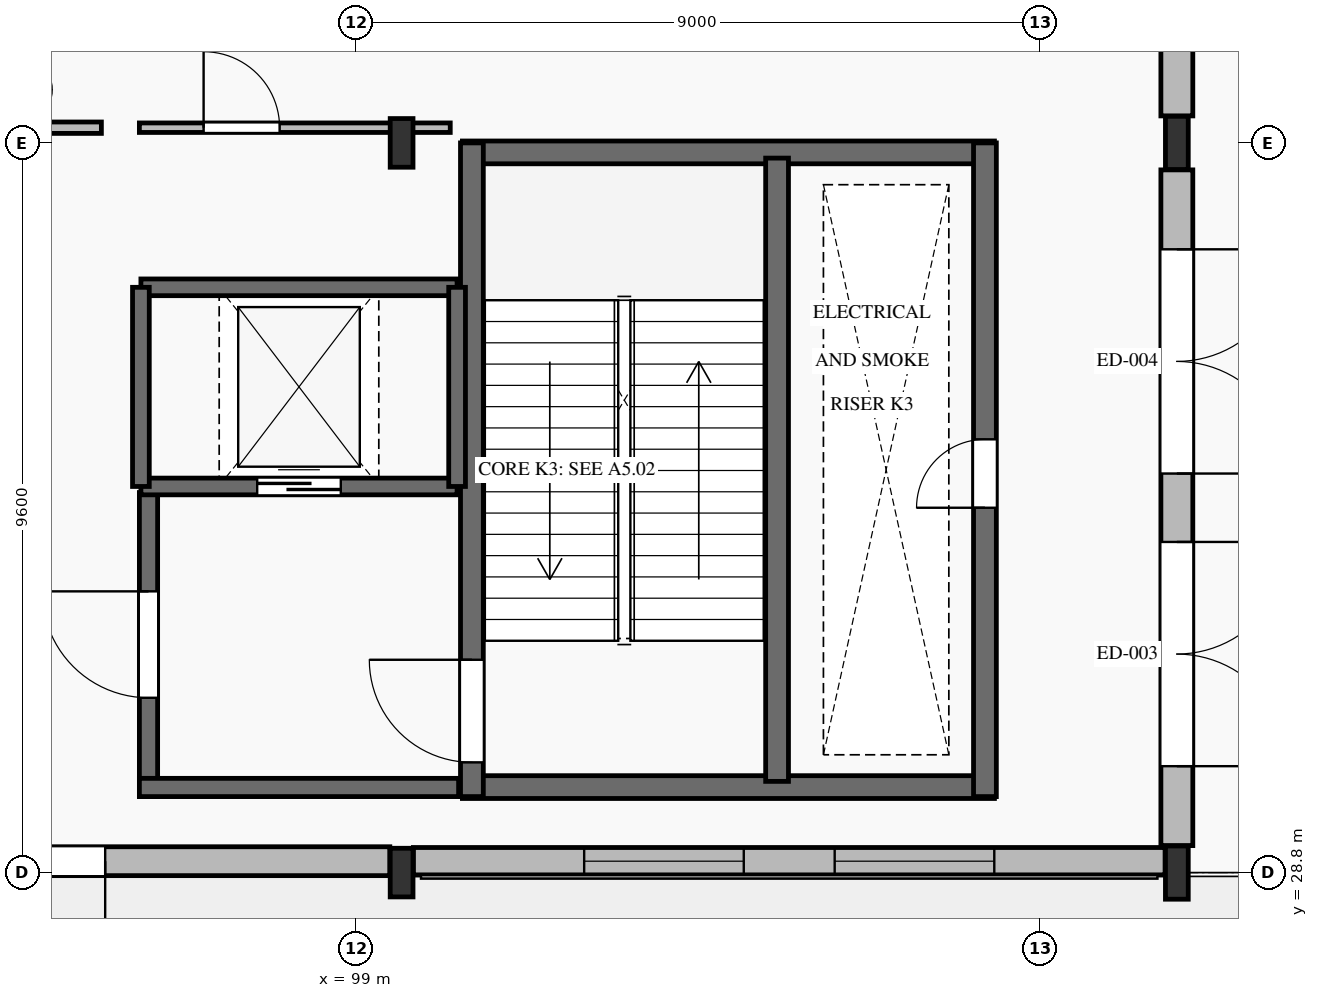
"""IFC4 building model, lengths in metres.
Left out: names, types, materials, properties, quantities, classifications, styles, units other than length and angle.
Written with IfcOpenShell. Run it as: python <this file> out.ifc"""

import sys

from ifc_helpers import new_model, si_unit, direction, frame, frame_2d, origin, origin_2d, place, context, subcontext, project, spatial, rectangle, i_section, extrude, element, fill, save


model = new_model("IFC4")
c1 = context("Model", 3, precision=1e-05, world=origin(), true_north=direction((0.0, 1.0)))
c2 = subcontext(c1, "Body", "Model", "MODEL_VIEW")
j1 = project(units=[si_unit("LENGTHUNIT", "METRE"), si_unit("PLANEANGLEUNIT", "RADIAN")], contexts=[c1])
p1 = place(None, origin())
s1 = spatial("IfcSite", under=j1, at=p1, CompositionType="ELEMENT")
p2 = place(p1, origin())
s2 = spatial("IfcBuilding", under=s1, at=p2, CompositionType="ELEMENT")
p3 = place(p2, origin())
s3 = spatial("IfcBuildingStorey", under=s2, at=p3, CompositionType="ELEMENT", Elevation=0.0)
for number, where, z_axis, x_axis in (
    (1, (109.8, 28.8, 0.0), (0.0, 0.0, 1.0), (1.0, 0.0, 0.0)),
    (2, (109.8, 38.4, 0.0), (0.0, 0.0, 1.0), (1.0, 0.0, 0.0)),
):
    element("IfcColumn", number, at=place(p3, frame(where, z_axis=z_axis, x_axis=x_axis)), inside=s3, PredefinedType="COLUMN", context=c2, shape_type="SweptSolid", body=[
        extrude(i_section(OverallWidth=0.3, OverallDepth=0.7, WebThickness=0.017, FlangeThickness=0.032, FilletRadius=0.027, at=origin_2d()), origin(), (0.0, 0.0, 1.0), 6.0),
    ])
for number, where, z_axis, x_axis in (
    (3, (99.6, 28.8, 0.0), (0.0, 0.0, 1.0), (1.0, 0.0, 0.0)),
    (4, (99.6, 38.4, 0.0), (0.0, 0.0, 1.0), (1.0, 0.0, 0.0)),
):
    element("IfcColumn", number, at=place(p3, frame(where, z_axis=z_axis, x_axis=x_axis)), inside=s3, PredefinedType="COLUMN", context=c2, shape_type="SweptSolid", body=[
        extrude(i_section(OverallWidth=0.3, OverallDepth=0.64, WebThickness=0.013, FlangeThickness=0.026, FilletRadius=0.027, at=origin_2d()), origin(), (0.0, 0.0, 1.0), 6.0),
    ])
p4 = place(p3, frame((109.8, 29.155, 0.0), z_axis=(0.0, 0.0, 1.0), x_axis=(0.0, 1.0, 0.0)))
e5 = element("IfcWall", 5, at=p4, inside=s3, PredefinedType="SOLIDWALL", context=c2, shape_type="SweptSolid", body=[
    extrude(rectangle(XDim=8.89, YDim=0.42, at=frame_2d((4.445, 0.0))), origin(), (0.0, 0.0, 1.0), 5.36),
])
p5 = place(p4, frame((1.045, 0.0, 0.0)))
e6 = element("IfcOpeningElement", 6, at=p5, cuts=e5, PredefinedType="OPENING", context=c2, shape_type="SweptSolid", body=[
    extrude(rectangle(XDim=2.95, YDim=2.9, at=frame_2d((1.475, 1.45))), frame((0.0, 0.225, 0.0), z_axis=(0.0, -1.0, 0.0), x_axis=(1.0, 0.0, 0.0)), (0.0, 0.0, 1.0), 0.45),
])
p6 = place(p4, frame((4.895, 0.0, 0.0)))
e7 = element("IfcOpeningElement", 7, at=p6, cuts=e5, PredefinedType="OPENING", context=c2, shape_type="SweptSolid", body=[
    extrude(rectangle(XDim=2.95, YDim=2.9, at=frame_2d((1.475, 1.45))), frame((0.0, 0.225, 0.0), z_axis=(0.0, -1.0, 0.0), x_axis=(1.0, 0.0, 0.0)), (0.0, 0.0, 1.0), 0.45),
])
p7 = place(p3, frame((109.8, 38.755, 0.0), z_axis=(0.0, 0.0, 1.0), x_axis=(0.0, 1.0, 0.0)))
e8 = element("IfcWall", 8, at=p7, inside=s3, PredefinedType="SOLIDWALL", context=c2, shape_type="SweptSolid", body=[
    extrude(rectangle(XDim=8.89, YDim=0.42, at=frame_2d((4.445, 0.0))), origin(), (0.0, 0.0, 1.0), 5.36),
])
p8 = place(p7, frame((1.045, 0.0, 0.0)))
e9 = element("IfcOpeningElement", 9, at=p8, cuts=e8, PredefinedType="OPENING", context=c2, shape_type="SweptSolid", body=[
    extrude(rectangle(XDim=2.95, YDim=2.9, at=frame_2d((1.475, 1.45))), frame((0.0, 0.225, 0.0), z_axis=(0.0, -1.0, 0.0), x_axis=(1.0, 0.0, 0.0)), (0.0, 0.0, 1.0), 0.45),
])
p9 = place(p7, frame((4.895, 0.0, 0.0)))
e10 = element("IfcOpeningElement", 10, at=p9, cuts=e8, PredefinedType="OPENING", context=c2, shape_type="SweptSolid", body=[
    extrude(rectangle(XDim=2.95, YDim=2.9, at=frame_2d((1.475, 1.45))), frame((0.0, 0.225, 0.0), z_axis=(0.0, -1.0, 0.0), x_axis=(1.0, 0.0, 0.0)), (0.0, 0.0, 1.0), 0.45),
])
p10 = place(p3, frame((89.555, 28.95, 0.0), z_axis=(0.0, 0.0, 1.0), x_axis=(1.0, 0.0, 0.0)))
e11 = element("IfcWall", 11, at=p10, inside=s3, PredefinedType="SOLIDWALL", context=c2, shape_type="SweptSolid", body=[
    extrude(rectangle(XDim=9.89, YDim=0.38, at=frame_2d((4.945, 0.0))), origin(), (0.0, 0.0, 1.0), 4.92),
])
p11 = place(p10, frame((3.745, 0.0, 0.0)))
e12 = element("IfcOpeningElement", 12, at=p11, cuts=e11, PredefinedType="OPENING", context=c2, shape_type="SweptSolid", body=[
    extrude(rectangle(XDim=2.4, YDim=2.5, at=frame_2d((1.2, 1.25))), frame((0.0, 0.205, 0.0), z_axis=(0.0, -1.0, 0.0), x_axis=(1.0, 0.0, 0.0)), (0.0, 0.0, 1.0), 0.41),
])
p12 = place(p3, frame((99.755, 28.95, 0.0), z_axis=(0.0, 0.0, 1.0), x_axis=(1.0, 0.0, 0.0)))
e13 = element("IfcWall", 13, at=p12, inside=s3, PredefinedType="SOLIDWALL", context=c2, shape_type="SweptSolid", body=[
    extrude(rectangle(XDim=9.89, YDim=0.36, at=frame_2d((4.945, 0.0))), origin(), (0.0, 0.0, 1.0), 4.92),
])
p13 = place(p12, frame((2.247, 0.0, 0.9)))
e14 = element("IfcOpeningElement", 14, at=p13, cuts=e13, PredefinedType="OPENING", context=c2, shape_type="SweptSolid", body=[
    extrude(rectangle(XDim=2.1, YDim=3.0, at=frame_2d((1.05, 1.5))), frame((0.0, 0.195, 0.0), z_axis=(0.0, -1.0, 0.0), x_axis=(1.0, 0.0, 0.0)), (0.0, 0.0, 1.0), 0.39),
])
p14 = place(p12, frame((5.543, 0.0, 0.9)))
e15 = element("IfcOpeningElement", 15, at=p14, cuts=e13, PredefinedType="OPENING", context=c2, shape_type="SweptSolid", body=[
    extrude(rectangle(XDim=2.1, YDim=3.0, at=frame_2d((1.05, 1.5))), frame((0.0, 0.195, 0.0), z_axis=(0.0, -1.0, 0.0), x_axis=(1.0, 0.0, 0.0)), (0.0, 0.0, 1.0), 0.39),
])
for number, where, z_axis, x_axis in (
    (16, (100.4, 29.925, 0.0), (0.0, 0.0, 1.0), (1.0, 0.0, 0.0)),
    (17, (100.4, 38.275, 0.0), (0.0, 0.0, 1.0), (1.0, 0.0, 0.0)),
):
    element("IfcWall", number, at=place(p3, frame(where, z_axis=z_axis, x_axis=x_axis)), inside=s3, PredefinedType="SHEAR", context=c2, shape_type="SweptSolid", body=[
        extrude(rectangle(XDim=7.0, YDim=0.3, at=frame_2d((3.5, 0.0))), origin(), (0.0, 0.0, 1.0), 6.0),
    ])
p15 = place(p3, frame((100.525, 29.8, 0.0), z_axis=(0.0, 0.0, 1.0), x_axis=(0.0, 1.0, 0.0)))
e18 = element("IfcWall", 18, at=p15, inside=s3, PredefinedType="SHEAR", context=c2, shape_type="SweptSolid", body=[
    extrude(rectangle(XDim=8.6, YDim=0.3, at=frame_2d((4.3, 0.0))), origin(), (0.0, 0.0, 1.0), 6.0),
])
p16 = place(p15, frame((0.45, 0.0, 0.0)))
e19 = element("IfcOpeningElement", 19, at=p16, cuts=e18, PredefinedType="OPENING", context=c2, shape_type="SweptSolid", body=[
    extrude(rectangle(XDim=1.35, YDim=2.2, at=frame_2d((0.675, 1.1))), frame((0.0, 0.165, 0.0), z_axis=(0.0, -1.0, 0.0), x_axis=(1.0, 0.0, 0.0)), (0.0, 0.0, 1.0), 0.33),
])
p17 = place(p3, frame((107.275, 29.8, 0.0), z_axis=(0.0, 0.0, 1.0), x_axis=(0.0, 1.0, 0.0)))
e20 = element("IfcWall", 20, at=p17, inside=s3, PredefinedType="SHEAR", context=c2, shape_type="SweptSolid", body=[
    extrude(rectangle(XDim=8.6, YDim=0.3, at=frame_2d((4.3, 0.0))), origin(), (0.0, 0.0, 1.0), 6.0),
])
p18 = place(p17, frame((3.8, 0.0, 0.0)))
e21 = element("IfcOpeningElement", 21, at=p18, cuts=e20, PredefinedType="OPENING", context=c2, shape_type="SweptSolid", body=[
    extrude(rectangle(XDim=0.9, YDim=2.05, at=frame_2d((0.45, 1.025))), frame((0.0, 0.165, 0.0), z_axis=(0.0, -1.0, 0.0), x_axis=(1.0, 0.0, 0.0)), (0.0, 0.0, 1.0), 0.33),
])
p19 = place(p3, frame((104.54, 30.0, 0.0), z_axis=(0.0, 0.0, 1.0), x_axis=(0.0, 1.0, 0.0)))
e22 = element("IfcWall", 22, at=p19, inside=s3, PredefinedType="SHEAR", context=c2, shape_type="SweptSolid", body=[
    extrude(rectangle(XDim=8.2, YDim=0.3, at=frame_2d((4.1, 0.0))), origin(), (0.0, 0.0, 1.0), 6.0),
])
p20 = place(p3, frame((96.27, 29.8, 0.0), z_axis=(0.0, 0.0, 1.0), x_axis=(0.0, 1.0, 0.0)))
e23 = element("IfcWall", 23, at=p20, inside=s3, PredefinedType="SHEAR", context=c2, shape_type="SweptSolid", body=[
    extrude(rectangle(XDim=4.0, YDim=0.24, at=frame_2d((2.0, 0.0))), origin(), (0.0, 0.0, 1.0), 6.0),
])
p21 = place(p20, frame((1.3, 0.0, 0.0)))
e24 = element("IfcOpeningElement", 24, at=p21, cuts=e23, PredefinedType="OPENING", context=c2, shape_type="SweptSolid", body=[
    extrude(rectangle(XDim=1.4, YDim=2.2, at=frame_2d((0.7, 1.1))), frame((0.0, 0.135, 0.0), z_axis=(0.0, -1.0, 0.0), x_axis=(1.0, 0.0, 0.0)), (0.0, 0.0, 1.0), 0.27),
])
p22 = place(p3, frame((96.15, 29.92, 0.0), z_axis=(0.0, 0.0, 1.0), x_axis=(1.0, 0.0, 0.0)))
e25 = element("IfcWall", 25, at=p22, inside=s3, PredefinedType="SHEAR", context=c2, shape_type="SweptSolid", body=[
    extrude(rectangle(XDim=4.2, YDim=0.24, at=frame_2d((2.1, 0.0))), origin(), (0.0, 0.0, 1.0), 6.0),
])
p23 = place(p3, frame((96.17, 33.88, 0.0), z_axis=(0.0, 0.0, 1.0), x_axis=(1.0, 0.0, 0.0)))
e26 = element("IfcWall", 26, at=p23, inside=s3, PredefinedType="SHEAR", context=c2, shape_type="SweptSolid", body=[
    extrude(rectangle(XDim=4.16, YDim=0.22, at=frame_2d((2.08, 0.0))), origin(), (0.0, 0.0, 1.0), 6.0),
])
p24 = place(p23, frame((1.53, 0.0, 0.0)))
e27 = element("IfcOpeningElement", 27, at=p24, cuts=e26, PredefinedType="OPENING", context=c2, shape_type="SweptSolid", body=[
    extrude(rectangle(XDim=1.1, YDim=2.15, at=frame_2d((0.55, 1.075))), frame((0.0, 0.125, 0.0), z_axis=(0.0, -1.0, 0.0), x_axis=(1.0, 0.0, 0.0)), (0.0, 0.0, 1.0), 0.25),
])
p25 = place(p3, frame((96.17, 36.5, 0.0), z_axis=(0.0, 0.0, 1.0), x_axis=(1.0, 0.0, 0.0)))
e28 = element("IfcWall", 28, at=p25, inside=s3, PredefinedType="SHEAR", context=c2, shape_type="SweptSolid", body=[
    extrude(rectangle(XDim=4.16, YDim=0.22, at=frame_2d((2.08, 0.0))), origin(), (0.0, 0.0, 1.0), 6.0),
])
for number, where, z_axis, x_axis in (
    (29, (96.17, 33.88, 0.0), (0.0, 0.0, 1.0), (0.0, 1.0, 0.0)),
    (30, (100.33, 33.88, 0.0), (0.0, 0.0, 1.0), (0.0, 1.0, 0.0)),
):
    element("IfcWall", number, at=place(p3, frame(where, z_axis=z_axis, x_axis=x_axis)), inside=s3, PredefinedType="SHEAR", context=c2, shape_type="SweptSolid", body=[
        extrude(rectangle(XDim=2.62, YDim=0.22, at=frame_2d((1.31, 0.0))), origin(), (0.0, 0.0, 1.0), 6.0),
    ])
p26 = place(p3, frame((89.15, 38.6, 0.0), z_axis=(0.0, 0.0, 1.0), x_axis=(1.0, 0.0, 0.0)))
e31 = element("IfcWall", 31, at=p26, inside=s3, PredefinedType="PARTITIONING", context=c2, shape_type="SweptSolid", body=[
    extrude(rectangle(XDim=6.5, YDim=0.15, at=frame_2d((3.25, 0.0))), origin(), (0.0, 0.0, 1.0), 4.92),
])
p27 = place(p26, frame((2.725, 0.0, 0.0)))
e32 = element("IfcOpeningElement", 32, at=p27, cuts=e31, PredefinedType="OPENING", context=c2, shape_type="SweptSolid", body=[
    extrude(rectangle(XDim=1.05, YDim=2.2, at=frame_2d((0.525, 1.1))), frame((0.0, 0.09, 0.0), z_axis=(0.0, -1.0, 0.0), x_axis=(1.0, 0.0, 0.0)), (0.0, 0.0, 1.0), 0.18),
])
p28 = place(p3, frame((96.15, 38.6, 0.0), z_axis=(0.0, 0.0, 1.0), x_axis=(1.0, 0.0, 0.0)))
e33 = element("IfcWall", 33, at=p28, inside=s3, PredefinedType="PARTITIONING", context=c2, shape_type="SweptSolid", body=[
    extrude(rectangle(XDim=4.09, YDim=0.125, at=frame_2d((2.045, 0.0))), origin(), (0.0, 0.0, 1.0), 4.92),
])
p29 = place(p28, frame((0.845, 0.0, 0.0)))
e34 = element("IfcOpeningElement", 34, at=p29, cuts=e33, PredefinedType="OPENING", context=c2, shape_type="SweptSolid", body=[
    extrude(rectangle(XDim=1.0, YDim=2.15, at=frame_2d((0.5, 1.075))), frame((0.0, 0.077, 0.0), z_axis=(0.0, -1.0, 0.0), x_axis=(1.0, 0.0, 0.0)), (0.0, 0.0, 1.0), 0.155),
])
p30 = place(p5, frame((2.95, 0.0, 0.0), z_axis=(0.0, 0.0, 1.0), x_axis=(-1.0, 0.0, 0.0)))
e35 = element("IfcDoor", 35, at=p30, inside=s3, OperationType="DOUBLE_DOOR_SINGLE_SWING", PredefinedType="DOOR", context=c2, shape_type="SweptSolid", body=[
    extrude(rectangle(XDim=2.95, YDim=2.9, at=frame_2d((1.475, 1.45))), frame((0.0, 0.025, 0.0), z_axis=(0.0, -1.0, 0.0), x_axis=(1.0, 0.0, 0.0)), (0.0, 0.0, 1.0), 0.05),
])
fill(e6, e35)
p31 = place(p6, frame((2.95, 0.0, 0.0), z_axis=(0.0, 0.0, 1.0), x_axis=(-1.0, 0.0, 0.0)))
e36 = element("IfcDoor", 36, at=p31, inside=s3, OperationType="DOUBLE_DOOR_SINGLE_SWING", PredefinedType="DOOR", context=c2, shape_type="SweptSolid", body=[
    extrude(rectangle(XDim=2.95, YDim=2.9, at=frame_2d((1.475, 1.45))), frame((0.0, 0.025, 0.0), z_axis=(0.0, -1.0, 0.0), x_axis=(1.0, 0.0, 0.0)), (0.0, 0.0, 1.0), 0.05),
])
fill(e7, e36)
p32 = place(p11, frame((2.4, 0.0, 0.0), z_axis=(0.0, 0.0, 1.0), x_axis=(-1.0, 0.0, 0.0)))
e37 = element("IfcDoor", 37, at=p32, inside=s3, OperationType="DOUBLE_DOOR_SINGLE_SWING", PredefinedType="DOOR", context=c2, shape_type="SweptSolid", body=[
    extrude(rectangle(XDim=2.4, YDim=2.5, at=frame_2d((1.2, 1.25))), frame((0.0, 0.025, 0.0), z_axis=(0.0, -1.0, 0.0), x_axis=(1.0, 0.0, 0.0)), (0.0, 0.0, 1.0), 0.05),
])
fill(e12, e37)
p33 = place(p13, origin())
e38 = element("IfcWindow", 38, at=p33, inside=s3, PartitioningType="SINGLE_PANEL", PredefinedType="WINDOW", context=c2, shape_type="SweptSolid", body=[
    extrude(rectangle(XDim=2.1, YDim=3.0, at=frame_2d((1.05, 1.5))), frame((0.0, 0.03, 0.0), z_axis=(0.0, -1.0, 0.0), x_axis=(1.0, 0.0, 0.0)), (0.0, 0.0, 1.0), 0.06),
])
fill(e14, e38)
p34 = place(p14, origin())
e39 = element("IfcWindow", 39, at=p34, inside=s3, PartitioningType="SINGLE_PANEL", PredefinedType="WINDOW", context=c2, shape_type="SweptSolid", body=[
    extrude(rectangle(XDim=2.1, YDim=3.0, at=frame_2d((1.05, 1.5))), frame((0.0, 0.03, 0.0), z_axis=(0.0, -1.0, 0.0), x_axis=(1.0, 0.0, 0.0)), (0.0, 0.0, 1.0), 0.06),
])
fill(e15, e39)
p35 = place(p16, origin())
e40 = element("IfcDoor", 40, at=p35, inside=s3, OperationType="SINGLE_SWING_RIGHT", PredefinedType="DOOR", context=c2, shape_type="SweptSolid", body=[
    extrude(rectangle(XDim=1.35, YDim=2.2, at=frame_2d((0.675, 1.1))), frame((0.0, 0.025, 0.0), z_axis=(0.0, -1.0, 0.0), x_axis=(1.0, 0.0, 0.0)), (0.0, 0.0, 1.0), 0.05),
])
fill(e19, e40)
p36 = place(p18, origin())
e41 = element("IfcDoor", 41, at=p36, inside=s3, OperationType="SINGLE_SWING_LEFT", PredefinedType="DOOR", context=c2, shape_type="SweptSolid", body=[
    extrude(rectangle(XDim=0.9, YDim=2.05, at=frame_2d((0.45, 1.025))), frame((0.0, 0.025, 0.0), z_axis=(0.0, -1.0, 0.0), x_axis=(1.0, 0.0, 0.0)), (0.0, 0.0, 1.0), 0.05),
])
fill(e21, e41)
p37 = place(p21, origin())
e42 = element("IfcDoor", 42, at=p37, inside=s3, OperationType="SINGLE_SWING_RIGHT", PredefinedType="DOOR", context=c2, shape_type="SweptSolid", body=[
    extrude(rectangle(XDim=1.4, YDim=2.2, at=frame_2d((0.7, 1.1))), frame((0.0, 0.025, 0.0), z_axis=(0.0, -1.0, 0.0), x_axis=(1.0, 0.0, 0.0)), (0.0, 0.0, 1.0), 0.05),
])
fill(e24, e42)
p38 = place(p24, origin())
e43 = element("IfcDoor", 43, at=p38, inside=s3, OperationType="SLIDING_TO_LEFT", PredefinedType="DOOR", context=c2, shape_type="SweptSolid", body=[
    extrude(rectangle(XDim=1.1, YDim=2.15, at=frame_2d((0.55, 1.075))), frame((0.0, 0.025, 0.0), z_axis=(0.0, -1.0, 0.0), x_axis=(1.0, 0.0, 0.0)), (0.0, 0.0, 1.0), 0.05),
])
fill(e27, e43)
p39 = place(p29, origin())
e44 = element("IfcDoor", 44, at=p39, inside=s3, OperationType="SINGLE_SWING_LEFT", PredefinedType="DOOR", context=c2, shape_type="SweptSolid", body=[
    extrude(rectangle(XDim=1.0, YDim=2.15, at=frame_2d((0.5, 1.075))), frame((0.0, 0.025, 0.0), z_axis=(0.0, -1.0, 0.0), x_axis=(1.0, 0.0, 0.0)), (0.0, 0.0, 1.0), 0.05),
])
fill(e34, e44)
save(model, sys.argv[1])
